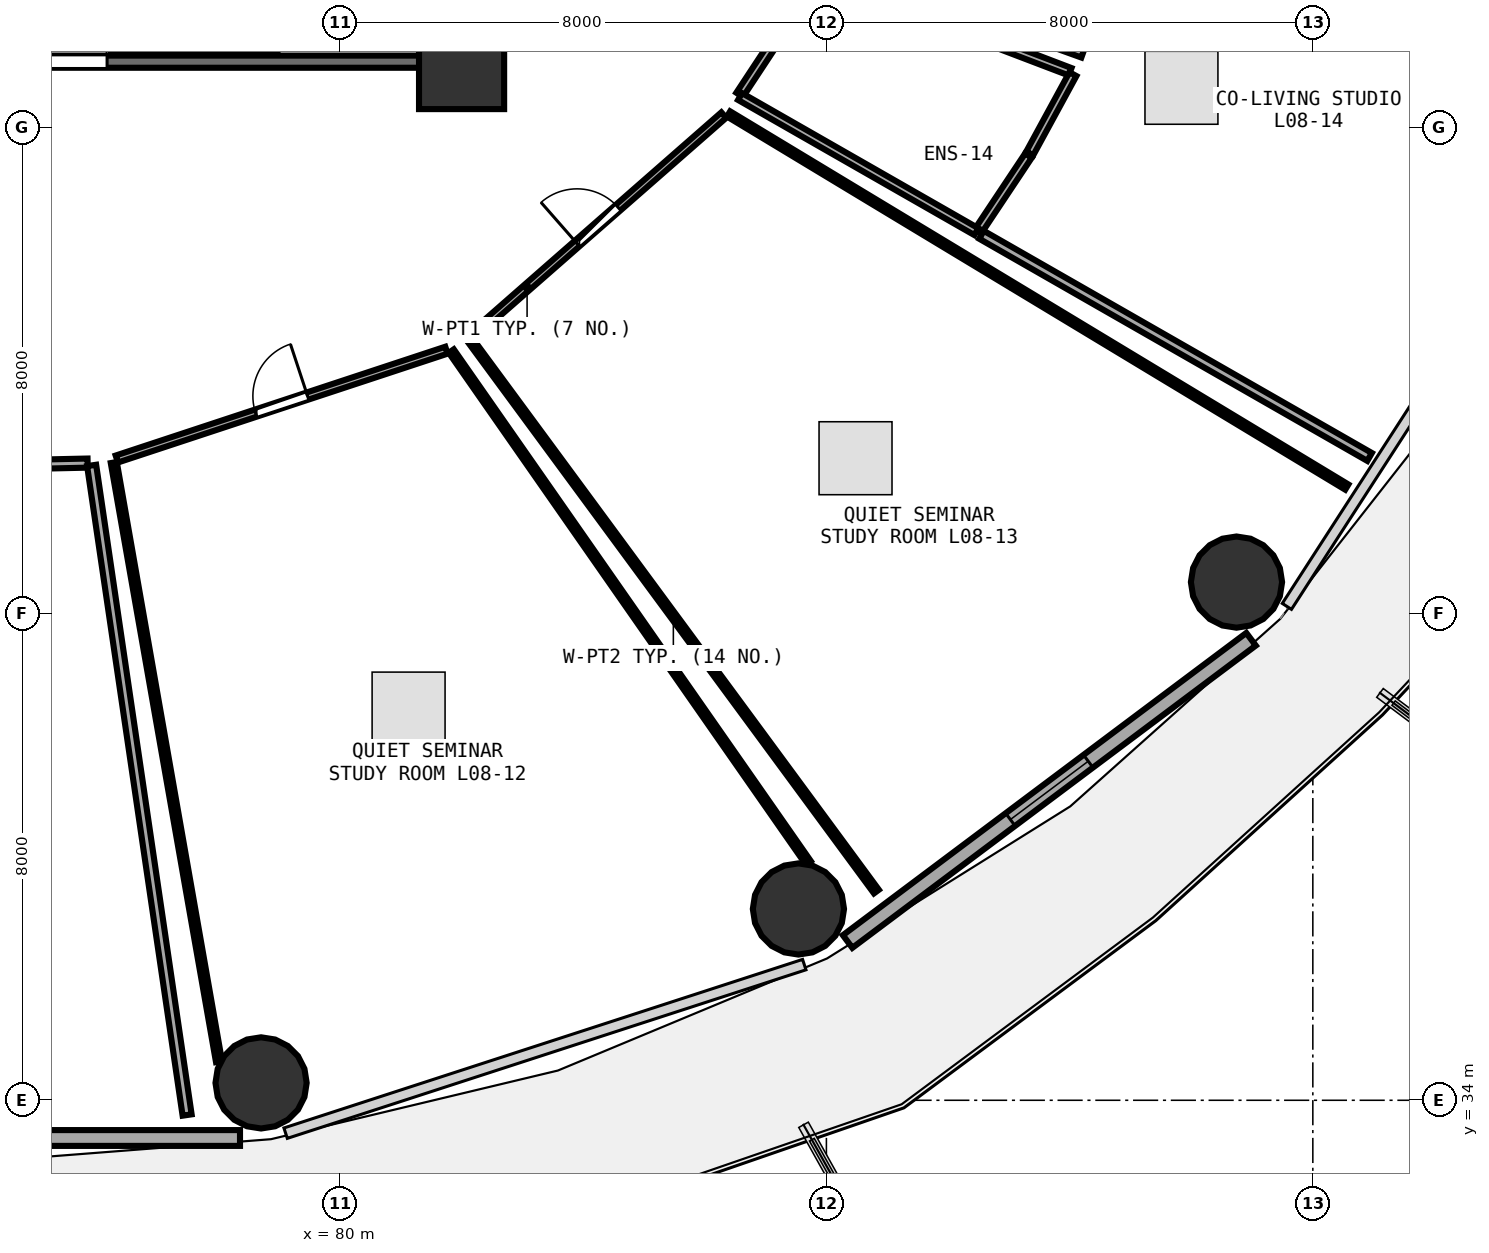
"""IFC4 building model, lengths in metres.
Left out: names, types, materials, properties, quantities, classifications, styles, units other than length and angle.
Written with IfcOpenShell. Run it as: python <this file> out.ifc"""

import sys

from ifc_helpers import new_model, si_unit, direction, frame, frame_2d, origin, origin_2d, place, context, subcontext, project, spatial, rectangle, circle, extrude, element, fill, save


model = new_model("IFC4")
c1 = context("Model", 3, precision=1e-05, world=origin(), true_north=direction((0.0, 1.0)))
c2 = subcontext(c1, "Body", "Model", "MODEL_VIEW")
j1 = project(units=[si_unit("LENGTHUNIT", "METRE"), si_unit("PLANEANGLEUNIT", "RADIAN")], contexts=[c1])
p1 = place(None, origin())
s1 = spatial("IfcSite", under=j1, at=p1, CompositionType="ELEMENT")
p2 = place(p1, origin())
s2 = spatial("IfcBuilding", under=s1, at=p2, CompositionType="ELEMENT")
p3 = place(p2, frame((0.0, 0.0, 33.75)))
s3 = spatial("IfcBuildingStorey", under=s2, at=p3, CompositionType="ELEMENT", Elevation=33.75)
p4 = place(p3, frame((82.0, 51.0, 0.0), z_axis=(0.0, 0.0, 1.0), x_axis=(1.0, 0.0, 0.0)))
e1 = element("IfcColumn", 1, at=p4, inside=s3, PredefinedType="PILASTER", context=c2, shape_type="SweptSolid", body=[
    extrude(rectangle(XDim=1.4, YDim=1.4, at=origin_2d()), origin(), (0.0, 0.0, 1.0), 3.75),
])
for number, where, z_axis, x_axis in (
    (2, (78.702, 34.286, 0.0), (0.0, 0.0, 1.0), (1.0, 0.0, 0.0)),
    (3, (87.54, 37.146, 0.0), (0.0, 0.0, 1.0), (1.0, 0.0, 0.0)),
    (4, (94.744, 42.522, 0.0), (0.0, 0.0, 1.0), (1.0, 0.0, 0.0)),
):
    element("IfcColumn", number, at=place(p3, frame(where, z_axis=z_axis, x_axis=x_axis)), inside=s3, PredefinedType="COLUMN", context=c2, shape_type="SweptSolid", body=[
        extrude(circle(Radius=0.75, at=origin_2d()), origin(), (0.0, 0.0, 1.0), 3.75),
    ])
p5 = place(p3, frame((69.644, 33.38, 0.0), z_axis=(0.0, 0.0, 1.0), x_axis=(1.0, 0.0, 0.0)))
e5 = element("IfcWall", 5, at=p5, inside=s3, PredefinedType="SOLIDWALL", context=c2, shape_type="SweptSolid", body=[
    extrude(rectangle(XDim=8.712, YDim=0.26, at=frame_2d((4.356, 0.0))), origin(), (0.0, 0.0, 1.0), 3.475),
])
p6 = place(p5, frame((3.556, 0.0, 0.85)))
e6 = element("IfcOpeningElement", 6, at=p6, cuts=e5, PredefinedType="OPENING", context=c2, shape_type="SweptSolid", body=[
    extrude(rectangle(XDim=1.6, YDim=1.45, at=frame_2d((0.8, 0.725))), frame((0.0, 0.14, 0.0), z_axis=(0.0, -1.0, 0.0), x_axis=(1.0, 0.0, 0.0)), (0.0, 0.0, 1.0), 0.28),
])
p7 = place(p3, frame((88.349, 36.611, 0.0), z_axis=(0.0, 0.0, 1.0), x_axis=(0.80030733173, 0.599590005569, 0.0)))
e7 = element("IfcWall", 7, at=p7, inside=s3, PredefinedType="SOLIDWALL", context=c2, shape_type="SweptSolid", body=[
    extrude(rectangle(XDim=8.291, YDim=0.26, at=frame_2d((4.145, 0.0))), origin(), (0.0, 0.0, 1.0), 3.475),
])
p8 = place(p7, frame((3.345, 0.0, 0.85)))
e8 = element("IfcOpeningElement", 8, at=p8, cuts=e7, PredefinedType="OPENING", context=c2, shape_type="SweptSolid", body=[
    extrude(rectangle(XDim=1.6, YDim=1.45, at=frame_2d((0.8, 0.725))), frame((0.0, 0.14, 0.0), z_axis=(0.0, -1.0, 0.0), x_axis=(1.0, 0.0, 0.0)), (0.0, 0.0, 1.0), 0.28),
])
p9 = place(p3, frame((74.0, 51.08, 0.0), z_axis=(0.0, 0.0, 1.0), x_axis=(1.0, 0.0, 0.0)))
e9 = element("IfcWall", 9, at=p9, inside=s3, PredefinedType="SHEAR", context=c2, shape_type="SweptSolid", body=[
    extrude(rectangle(XDim=7.9, YDim=0.2, at=frame_2d((3.95, 0.0))), origin(), (0.0, 0.0, 1.0), 3.49),
])
p10 = place(p9, frame((1.12, 0.0, 0.0)))
e10 = element("IfcOpeningElement", 10, at=p10, cuts=e9, PredefinedType="OPENING", context=c2, shape_type="SweptSolid", body=[
    extrude(rectangle(XDim=1.05, YDim=2.1, at=frame_2d((0.525, 1.05))), frame((0.0, 0.11, 0.0), z_axis=(0.0, -1.0, 0.0), x_axis=(1.0, 0.0, 0.0)), (0.0, 0.0, 1.0), 0.22),
])
p11 = place(p3, frame((82.02, 51.2, 0.0), z_axis=(0.0, 0.0, 1.0), x_axis=(0.0, 1.0, 0.0)))
e11 = element("IfcWall", 11, at=p11, inside=s3, PredefinedType="SHEAR", context=c2, shape_type="SweptSolid", body=[
    extrude(rectangle(XDim=3.07, YDim=0.2, at=frame_2d((1.535, 0.0))), origin(), (0.0, 0.0, 1.0), 3.49),
])
p12 = place(p3, frame((72.879, 44.413, 0.0), z_axis=(0.0, 0.0, 1.0), x_axis=(0.999757617916, 0.022016026426, 0.0)))
e12 = element("IfcWall", 12, at=p12, inside=s3, PredefinedType="PARTITIONING", context=c2, shape_type="SweptSolid", body=[
    extrude(rectangle(XDim=2.972, YDim=0.15, at=frame_2d((1.486, 0.0))), origin(), (0.0, 0.0, 1.0), 3.48),
])
p13 = place(p12, frame((1.011, 0.0, 0.0)))
e13 = element("IfcOpeningElement", 13, at=p13, cuts=e12, PredefinedType="OPENING", context=c2, shape_type="SweptSolid", body=[
    extrude(rectangle(XDim=0.95, YDim=2.08, at=frame_2d((0.475, 1.04))), frame((0.0, 0.085, 0.0), z_axis=(0.0, -1.0, 0.0), x_axis=(1.0, 0.0, 0.0)), (0.0, 0.0, 1.0), 0.17),
])
p14 = place(p3, frame((76.33, 44.546, 0.0), z_axis=(0.0, 0.0, 1.0), x_axis=(0.949607265123, 0.313442246716, 0.0)))
e14 = element("IfcWall", 14, at=p14, inside=s3, PredefinedType="PARTITIONING", context=c2, shape_type="SweptSolid", body=[
    extrude(rectangle(XDim=5.708, YDim=0.12, at=frame_2d((2.854, 0.0))), origin(), (0.0, 0.0, 1.0), 2.875),
])
p15 = place(p14, frame((2.404, 0.0, 0.0)))
e15 = element("IfcOpeningElement", 15, at=p15, cuts=e14, PredefinedType="OPENING", context=c2, shape_type="SweptSolid", body=[
    extrude(rectangle(XDim=0.9, YDim=2.08, at=frame_2d((0.45, 1.04))), frame((0.0, 0.07, 0.0), z_axis=(0.0, -1.0, 0.0), x_axis=(1.0, 0.0, 0.0)), (0.0, 0.0, 1.0), 0.14),
])
p16 = place(p3, frame((82.165, 46.57, 0.0), z_axis=(0.0, 0.0, 1.0), x_axis=(0.752285806045, 0.658836903963, 0.0)))
e16 = element("IfcWall", 16, at=p16, inside=s3, PredefinedType="PARTITIONING", context=c2, shape_type="SweptSolid", body=[
    extrude(rectangle(XDim=5.512, YDim=0.12, at=frame_2d((2.756, 0.0))), origin(), (0.0, 0.0, 1.0), 2.875),
])
p17 = place(p16, frame((2.306, 0.0, 0.0)))
e17 = element("IfcOpeningElement", 17, at=p17, cuts=e16, PredefinedType="OPENING", context=c2, shape_type="SweptSolid", body=[
    extrude(rectangle(XDim=0.9, YDim=2.08, at=frame_2d((0.45, 1.04))), frame((0.0, 0.07, 0.0), z_axis=(0.0, -1.0, 0.0), x_axis=(1.0, 0.0, 0.0)), (0.0, 0.0, 1.0), 0.14),
])
p18 = place(p3, frame((87.823, 52.51, 0.0), z_axis=(0.0, 0.0, 1.0), x_axis=(0.934413446892, -0.356190272562, 0.0)))
e18 = element("IfcWall", 18, at=p18, inside=s3, PredefinedType="PLUMBINGWALL", context=c2, shape_type="SweptSolid", body=[
    extrude(rectangle(XDim=4.479, YDim=0.13, at=frame_2d((2.239, 0.0))), origin(), (0.0, 0.0, 1.0), 3.235),
])
p19 = place(p18, frame((1.809, 0.0, 0.0)))
e19 = element("IfcOpeningElement", 19, at=p19, cuts=e18, PredefinedType="OPENING", context=c2, shape_type="SweptSolid", body=[
    extrude(rectangle(XDim=0.86, YDim=2.05, at=frame_2d((0.43, 1.025))), frame((0.0, 0.075, 0.0), z_axis=(0.0, -1.0, 0.0), x_axis=(1.0, 0.0, 0.0)), (0.0, 0.0, 1.0), 0.15),
])
p20 = place(p3, frame((75.916, 44.44, 0.0), z_axis=(0.0, 0.0, 1.0), x_axis=(0.145430849227, -0.989368418787, 0.0)))
e20 = element("IfcWall", 20, at=p20, inside=s3, PredefinedType="PARTITIONING", context=c2, shape_type="SweptSolid", body=[
    extrude(rectangle(XDim=10.798, YDim=0.15, at=frame_2d((5.399, 0.0))), origin(), (0.0, 0.0, 1.0), 2.875),
])
p21 = place(p3, frame((81.831, 46.321, 0.0), z_axis=(0.0, 0.0, 1.0), x_axis=(0.572190897837, -0.820120464586, 0.0)))
e21 = element("IfcWall", 21, at=p21, inside=s3, PredefinedType="PARTITIONING", context=c2, shape_type="SweptSolid", body=[
    extrude(rectangle(XDim=10.264, YDim=0.1, at=frame_2d((5.132, 0.0))), origin(), (0.0, 0.0, 1.0), 2.875),
])
p22 = place(p3, frame((78.01, 34.635, 0.0), z_axis=(0.0, 0.0, 1.0), x_axis=(-0.173016726169, 0.984918886237, 0.0)))
e22 = element("IfcWall", 22, at=p22, inside=s3, PredefinedType="PARTITIONING", context=c2, shape_type="SweptSolid", body=[
    extrude(rectangle(XDim=10.003, YDim=0.1, at=frame_2d((5.001, 0.0))), origin(), (0.0, 0.0, 1.0), 3.175),
])
p23 = place(p3, frame((86.391, 50.22, 0.0), z_axis=(0.0, 0.0, 1.0), x_axis=(0.856195030458, -0.516652755551, 0.0)))
e23 = element("IfcWall", 23, at=p23, inside=s3, PredefinedType="PARTITIONING", context=c2, shape_type="SweptSolid", body=[
    extrude(rectangle(XDim=11.875, YDim=0.1, at=frame_2d((5.938, 0.0))), origin(), (0.0, 0.0, 1.0), 2.875),
])
p24 = place(p3, frame((88.822, 37.432, 0.0), z_axis=(0.0, 0.0, 1.0), x_axis=(-0.593112501052, 0.805119594281, 0.0)))
e24 = element("IfcWall", 24, at=p24, inside=s3, PredefinedType="PARTITIONING", context=c2, shape_type="SweptSolid", body=[
    extrude(rectangle(XDim=11.26, YDim=0.1, at=frame_2d((5.63, 0.0))), origin(), (0.0, 0.0, 1.0), 2.875),
])
p25 = place(p3, frame((86.573, 50.534, 0.0), z_axis=(0.0, 0.0, 1.0), x_axis=(0.550537530442, 0.834810414151, 0.0)))
e25 = element("IfcWall", 25, at=p25, inside=s3, PredefinedType="PLUMBINGWALL", context=c2, shape_type="SweptSolid", body=[
    extrude(rectangle(XDim=1.139, YDim=0.13, at=frame_2d((0.569, 0.0))), origin(), (0.0, 0.0, 1.0), 2.875),
])
p26 = place(p3, frame((92.054, 50.875, 0.0), z_axis=(0.0, 0.0, 1.0), x_axis=(-0.47818376891, -0.878259803903, 0.0)))
e26 = element("IfcWall", 26, at=p26, inside=s3, PredefinedType="PLUMBINGWALL", context=c2, shape_type="SweptSolid", body=[
    extrude(rectangle(XDim=1.485, YDim=0.13, at=frame_2d((0.742, 0.0))), origin(), (0.0, 0.0, 1.0), 2.875),
])
p27 = place(p3, frame((91.324, 49.537, 0.0), z_axis=(0.0, 0.0, 1.0), x_axis=(-0.554361413566, -0.832276049847, 0.0)))
e27 = element("IfcWall", 27, at=p27, inside=s3, PredefinedType="PLUMBINGWALL", context=c2, shape_type="SweptSolid", body=[
    extrude(rectangle(XDim=1.497, YDim=0.13, at=frame_2d((0.749, 0.0))), origin(), (0.0, 0.0, 1.0), 3.48),
])
p28 = place(p3, frame((90.466, 48.285, 0.0), z_axis=(0.0, 0.0, 1.0), x_axis=(-0.868102152808, 0.496385588319, 0.0)))
e28 = element("IfcWall", 28, at=p28, inside=s3, PredefinedType="PLUMBINGWALL", context=c2, shape_type="SweptSolid", body=[
    extrude(rectangle(XDim=4.477, YDim=0.13, at=frame_2d((2.238, 0.0))), origin(), (0.0, 0.0, 1.0), 2.875),
])
p29 = place(p3, frame((96.933, 44.58, 0.0), z_axis=(0.0, 0.0, 1.0), x_axis=(-0.8678833592, 0.496768029188, 0.0)))
e29 = element("IfcWall", 29, at=p29, inside=s3, PredefinedType="PARTITIONING", context=c2, shape_type="SweptSolid", body=[
    extrude(rectangle(XDim=7.354, YDim=0.15, at=frame_2d((3.677, 0.0))), origin(), (0.0, 0.0, 1.0), 2.875),
])
p30 = place(p3, frame((92.219, 51.219, 0.0), z_axis=(0.0, 0.0, 1.0), x_axis=(-0.940607228955, 0.339496746433, 0.0)))
e30 = element("IfcWall", 30, at=p30, inside=s3, PredefinedType="PARTITIONING", context=c2, shape_type="SweptSolid", body=[
    extrude(rectangle(XDim=1.868, YDim=0.15, at=frame_2d((0.934, 0.0))), origin(), (0.0, 0.0, 1.0), 3.48),
])
p31 = place(p8, origin())
e31 = element("IfcWindow", 31, at=p31, inside=s3, PartitioningType="SINGLE_PANEL", PredefinedType="WINDOW", context=c2, shape_type="SweptSolid", body=[
    extrude(rectangle(XDim=1.6, YDim=1.45, at=frame_2d((0.8, 0.725))), frame((0.0, 0.03, 0.0), z_axis=(0.0, -1.0, 0.0), x_axis=(1.0, 0.0, 0.0)), (0.0, 0.0, 1.0), 0.06),
])
fill(e8, e31)
p32 = place(p10, origin())
e32 = element("IfcDoor", 32, at=p32, inside=s3, OperationType="SINGLE_SWING_LEFT", PredefinedType="DOOR", context=c2, shape_type="SweptSolid", body=[
    extrude(rectangle(XDim=1.05, YDim=2.1, at=frame_2d((0.525, 1.05))), frame((0.0, 0.025, 0.0), z_axis=(0.0, -1.0, 0.0), x_axis=(1.0, 0.0, 0.0)), (0.0, 0.0, 1.0), 0.05),
])
fill(e10, e32)
p33 = place(p15, origin())
e33 = element("IfcDoor", 33, at=p33, inside=s3, OperationType="SINGLE_SWING_RIGHT", PredefinedType="DOOR", context=c2, shape_type="SweptSolid", body=[
    extrude(rectangle(XDim=0.9, YDim=2.08, at=frame_2d((0.45, 1.04))), frame((0.0, 0.025, 0.0), z_axis=(0.0, -1.0, 0.0), x_axis=(1.0, 0.0, 0.0)), (0.0, 0.0, 1.0), 0.05),
])
fill(e15, e33)
p34 = place(p17, origin())
e34 = element("IfcDoor", 34, at=p34, inside=s3, OperationType="SINGLE_SWING_LEFT", PredefinedType="DOOR", context=c2, shape_type="SweptSolid", body=[
    extrude(rectangle(XDim=0.9, YDim=2.08, at=frame_2d((0.45, 1.04))), frame((0.0, 0.025, 0.0), z_axis=(0.0, -1.0, 0.0), x_axis=(1.0, 0.0, 0.0)), (0.0, 0.0, 1.0), 0.05),
])
fill(e17, e34)
save(model, sys.argv[1])
